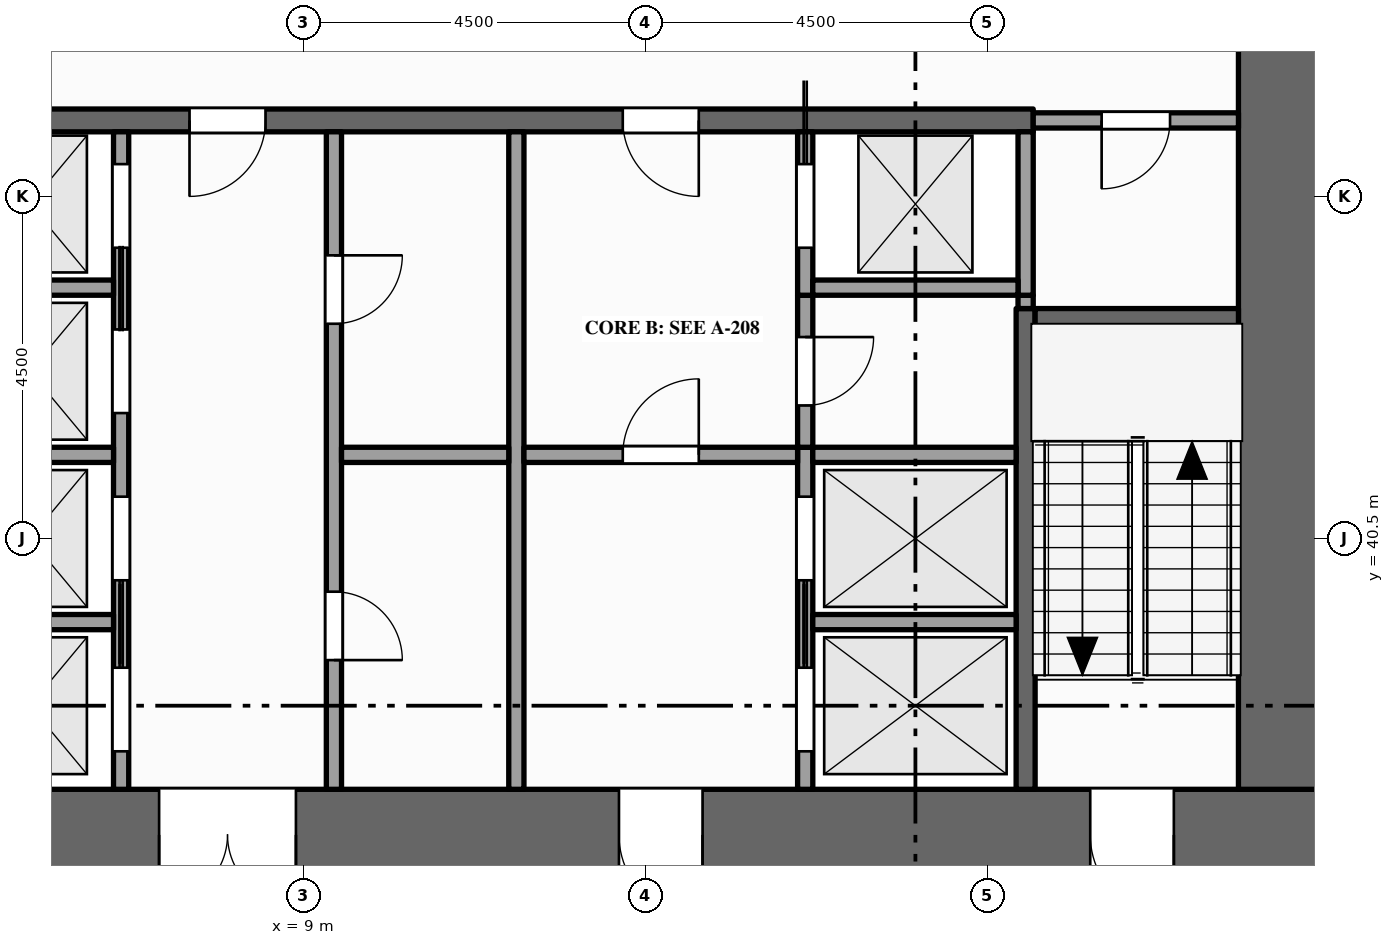
"""IFC4 building model, lengths in metres.
Left out: names, types, materials, properties, quantities, classifications, styles, units other than length and angle.
Written with IfcOpenShell. Run it as: python <this file> out.ifc"""

import sys

from ifc_helpers import new_model, si_unit, direction, frame, frame_2d, origin, place, context, subcontext, project, spatial, rectangle, extrude, element, fill, save


model = new_model("IFC4")
c1 = context("Model", 3, precision=1e-05, world=origin(), true_north=direction((0.0, 1.0)))
c2 = subcontext(c1, "Body", "Model", "MODEL_VIEW")
j1 = project(units=[si_unit("LENGTHUNIT", "METRE"), si_unit("PLANEANGLEUNIT", "RADIAN")], contexts=[c1])
p1 = place(None, origin())
s1 = spatial("IfcSite", under=j1, at=p1, CompositionType="ELEMENT")
p2 = place(p1, origin())
s2 = spatial("IfcBuilding", under=s1, at=p2, CompositionType="ELEMENT")
p3 = place(p2, frame((0.0, 0.0, 41.0)))
s3 = spatial("IfcBuildingStorey", under=s2, at=p3, CompositionType="ELEMENT", Elevation=41.0)
p4 = place(p3, frame((0.0, 36.6, -0.15), z_axis=(0.0, 0.0, 1.0), x_axis=(1.0, 0.0, 0.0)))
e1 = element("IfcWall", 1, at=p4, inside=s3, PredefinedType="SHEAR", context=c2, shape_type="SweptSolid", body=[
    extrude(rectangle(XDim=22.5, YDim=1.2, at=frame_2d((11.25, 0.0))), origin(), (0.0, 0.0, 1.0), 4.0),
])
p5 = place(p4, frame((7.1, 0.0, 0.15)))
e2 = element("IfcOpeningElement", 2, at=p5, cuts=e1, PredefinedType="OPENING", context=c2, shape_type="SweptSolid", body=[
    extrude(rectangle(XDim=1.8, YDim=2.1, at=frame_2d((0.9, 1.05))), frame((0.0, 0.61, 0.0), z_axis=(0.0, -1.0, 0.0), x_axis=(1.0, 0.0, 0.0)), (0.0, 0.0, 1.0), 1.22),
])
p6 = place(p4, frame((13.15, 0.0, 0.15)))
e3 = element("IfcOpeningElement", 3, at=p6, cuts=e1, PredefinedType="OPENING", context=c2, shape_type="SweptSolid", body=[
    extrude(rectangle(XDim=1.1, YDim=2.1, at=frame_2d((0.55, 1.05))), frame((0.0, 0.61, 0.0), z_axis=(0.0, -1.0, 0.0), x_axis=(1.0, 0.0, 0.0)), (0.0, 0.0, 1.0), 1.22),
])
p7 = place(p4, frame((2.15, 0.0, 0.15)))
e4 = element("IfcOpeningElement", 4, at=p7, cuts=e1, PredefinedType="OPENING", context=c2, shape_type="SweptSolid", body=[
    extrude(rectangle(XDim=1.1, YDim=2.1, at=frame_2d((0.55, 1.05))), frame((0.0, 0.61, 0.0), z_axis=(0.0, -1.0, 0.0), x_axis=(1.0, 0.0, 0.0)), (0.0, 0.0, 1.0), 1.22),
])
p8 = place(p4, frame((19.35, 0.0, 0.15)))
e5 = element("IfcOpeningElement", 5, at=p8, cuts=e1, PredefinedType="OPENING", context=c2, shape_type="SweptSolid", body=[
    extrude(rectangle(XDim=1.1, YDim=2.1, at=frame_2d((0.55, 1.05))), frame((0.0, 0.61, 0.0), z_axis=(0.0, -1.0, 0.0), x_axis=(1.0, 0.0, 0.0)), (0.0, 0.0, 1.0), 1.22),
])
p9 = place(p3, frame((21.9, 37.2, -0.15), z_axis=(0.0, 0.0, 1.0), x_axis=(0.0, 1.0, 0.0)))
e6 = element("IfcWall", 6, at=p9, inside=s3, PredefinedType="SHEAR", context=c2, shape_type="SweptSolid", body=[
    extrude(rectangle(XDim=11.1, YDim=1.2, at=frame_2d((5.55, 0.0))), origin(), (0.0, 0.0, 1.0), 4.0),
])
p10 = place(p3, frame((6.6, 37.2, 0.0), z_axis=(0.0, 0.0, 1.0), x_axis=(0.0, 1.0, 0.0)))
e7 = element("IfcWall", 7, at=p10, inside=s3, PredefinedType="SOLIDWALL", context=c2, shape_type="SweptSolid", body=[
    extrude(rectangle(XDim=8.65, YDim=0.2, at=frame_2d((4.325, 0.0))), origin(), (0.0, 0.0, 1.0), 3.85),
])
p11 = place(p10, frame((0.5, 0.0, 0.012)))
e8 = element("IfcOpeningElement", 8, at=p11, cuts=e7, PredefinedType="OPENING", context=c2, shape_type="SweptSolid", body=[
    extrude(rectangle(XDim=1.1, YDim=2.1, at=frame_2d((0.55, 1.05))), frame((0.0, 0.11, 0.0), z_axis=(0.0, -1.0, 0.0), x_axis=(1.0, 0.0, 0.0)), (0.0, 0.0, 1.0), 0.22),
])
p12 = place(p10, frame((2.75, 0.0, 0.012)))
e9 = element("IfcOpeningElement", 9, at=p12, cuts=e7, PredefinedType="OPENING", context=c2, shape_type="SweptSolid", body=[
    extrude(rectangle(XDim=1.1, YDim=2.1, at=frame_2d((0.55, 1.05))), frame((0.0, 0.11, 0.0), z_axis=(0.0, -1.0, 0.0), x_axis=(1.0, 0.0, 0.0)), (0.0, 0.0, 1.0), 0.22),
])
p13 = place(p10, frame((4.95, 0.0, 0.012)))
e10 = element("IfcOpeningElement", 10, at=p13, cuts=e7, PredefinedType="OPENING", context=c2, shape_type="SweptSolid", body=[
    extrude(rectangle(XDim=1.1, YDim=2.1, at=frame_2d((0.55, 1.05))), frame((0.0, 0.11, 0.0), z_axis=(0.0, -1.0, 0.0), x_axis=(1.0, 0.0, 0.0)), (0.0, 0.0, 1.0), 0.22),
])
p14 = place(p10, frame((7.125, 0.0, 0.012)))
e11 = element("IfcOpeningElement", 11, at=p14, cuts=e7, PredefinedType="OPENING", context=c2, shape_type="SweptSolid", body=[
    extrude(rectangle(XDim=1.1, YDim=2.1, at=frame_2d((0.55, 1.05))), frame((0.0, 0.11, 0.0), z_axis=(0.0, -1.0, 0.0), x_axis=(1.0, 0.0, 0.0)), (0.0, 0.0, 1.0), 0.22),
])
p15 = place(p3, frame((9.4, 37.2, 0.0), z_axis=(0.0, 0.0, 1.0), x_axis=(0.0, 1.0, 0.0)))
e12 = element("IfcWall", 12, at=p15, inside=s3, PredefinedType="PARTITIONING", context=c2, shape_type="SweptSolid", body=[
    extrude(rectangle(XDim=8.65, YDim=0.2, at=frame_2d((4.325, 0.0))), origin(), (0.0, 0.0, 1.0), 3.85),
])
p16 = place(p15, frame((1.7, 0.0, 0.0)))
e13 = element("IfcOpeningElement", 13, at=p16, cuts=e12, PredefinedType="OPENING", context=c2, shape_type="SweptSolid", body=[
    extrude(rectangle(XDim=0.9, YDim=2.1, at=frame_2d((0.45, 1.05))), frame((0.0, 0.11, 0.0), z_axis=(0.0, -1.0, 0.0), x_axis=(1.0, 0.0, 0.0)), (0.0, 0.0, 1.0), 0.22),
])
p17 = place(p15, frame((6.125, 0.0, 0.0)))
e14 = element("IfcOpeningElement", 14, at=p17, cuts=e12, PredefinedType="OPENING", context=c2, shape_type="SweptSolid", body=[
    extrude(rectangle(XDim=0.9, YDim=2.1, at=frame_2d((0.45, 1.05))), frame((0.0, 0.11, 0.0), z_axis=(0.0, -1.0, 0.0), x_axis=(1.0, 0.0, 0.0)), (0.0, 0.0, 1.0), 0.22),
])
p18 = place(p3, frame((11.8, 37.2, 0.0), z_axis=(0.0, 0.0, 1.0), x_axis=(0.0, 1.0, 0.0)))
e15 = element("IfcWall", 15, at=p18, inside=s3, PredefinedType="PARTITIONING", context=c2, shape_type="SweptSolid", body=[
    extrude(rectangle(XDim=8.65, YDim=0.2, at=frame_2d((4.325, 0.0))), origin(), (0.0, 0.0, 1.0), 3.85),
])
p19 = place(p3, frame((15.6, 37.2, 0.0), z_axis=(0.0, 0.0, 1.0), x_axis=(0.0, 1.0, 0.0)))
e16 = element("IfcWall", 16, at=p19, inside=s3, PredefinedType="SOLIDWALL", context=c2, shape_type="SweptSolid", body=[
    extrude(rectangle(XDim=4.5, YDim=0.2, at=frame_2d((2.25, 0.0))), origin(), (0.0, 0.0, 1.0), 3.85),
])
p20 = place(p19, frame((0.5, 0.0, 0.012)))
e17 = element("IfcOpeningElement", 17, at=p20, cuts=e16, PredefinedType="OPENING", context=c2, shape_type="SweptSolid", body=[
    extrude(rectangle(XDim=1.1, YDim=2.1, at=frame_2d((0.55, 1.05))), frame((0.0, 0.11, 0.0), z_axis=(0.0, -1.0, 0.0), x_axis=(1.0, 0.0, 0.0)), (0.0, 0.0, 1.0), 0.22),
])
p21 = place(p19, frame((2.75, 0.0, 0.012)))
e18 = element("IfcOpeningElement", 18, at=p21, cuts=e16, PredefinedType="OPENING", context=c2, shape_type="SweptSolid", body=[
    extrude(rectangle(XDim=1.1, YDim=2.1, at=frame_2d((0.55, 1.05))), frame((0.0, 0.11, 0.0), z_axis=(0.0, -1.0, 0.0), x_axis=(1.0, 0.0, 0.0)), (0.0, 0.0, 1.0), 0.22),
])
p22 = place(p3, frame((15.6, 41.7, 0.0), z_axis=(0.0, 0.0, 1.0), x_axis=(0.0, 1.0, 0.0)))
e19 = element("IfcWall", 19, at=p22, inside=s3, PredefinedType="PARTITIONING", context=c2, shape_type="SweptSolid", body=[
    extrude(rectangle(XDim=2.0, YDim=0.2, at=frame_2d((1.0, 0.0))), origin(), (0.0, 0.0, 1.0), 3.85),
])
p23 = place(p22, frame((0.55, 0.0, 0.0)))
e20 = element("IfcOpeningElement", 20, at=p23, cuts=e19, PredefinedType="OPENING", context=c2, shape_type="SweptSolid", body=[
    extrude(rectangle(XDim=0.9, YDim=2.1, at=frame_2d((0.45, 1.05))), frame((0.0, 0.11, 0.0), z_axis=(0.0, -1.0, 0.0), x_axis=(1.0, 0.0, 0.0)), (0.0, 0.0, 1.0), 0.22),
])
p24 = place(p3, frame((15.6, 43.7, 0.0), z_axis=(0.0, 0.0, 1.0), x_axis=(0.0, 1.0, 0.0)))
e21 = element("IfcWall", 21, at=p24, inside=s3, PredefinedType="SOLIDWALL", context=c2, shape_type="SweptSolid", body=[
    extrude(rectangle(XDim=2.15, YDim=0.2, at=frame_2d((1.075, 0.0))), origin(), (0.0, 0.0, 1.0), 3.85),
])
p25 = place(p24, frame((0.625, 0.0, 0.012)))
e22 = element("IfcOpeningElement", 22, at=p25, cuts=e21, PredefinedType="OPENING", context=c2, shape_type="SweptSolid", body=[
    extrude(rectangle(XDim=1.1, YDim=2.1, at=frame_2d((0.55, 1.05))), frame((0.0, 0.11, 0.0), z_axis=(0.0, -1.0, 0.0), x_axis=(1.0, 0.0, 0.0)), (0.0, 0.0, 1.0), 0.22),
])
p26 = place(p3, frame((18.5, 37.2, 0.0), z_axis=(0.0, 0.0, 1.0), x_axis=(0.0, 1.0, 0.0)))
e23 = element("IfcWall", 23, at=p26, inside=s3, PredefinedType="SHEAR", context=c2, shape_type="SweptSolid", body=[
    extrude(rectangle(XDim=6.325, YDim=0.25, at=frame_2d((3.163, 0.0))), origin(), (0.0, 0.0, 1.0), 3.85),
])
p27 = place(p3, frame((18.5, 43.525, 0.0), z_axis=(0.0, 0.0, 1.0), x_axis=(0.0, 1.0, 0.0)))
e24 = element("IfcWall", 24, at=p27, inside=s3, PredefinedType="PARTITIONING", context=c2, shape_type="SweptSolid", body=[
    extrude(rectangle(XDim=0.175, YDim=0.2, at=frame_2d((0.087, 0.0))), origin(), (0.0, 0.0, 1.0), 3.85),
])
p28 = place(p3, frame((18.5, 43.7, 0.0), z_axis=(0.0, 0.0, 1.0), x_axis=(0.0, 1.0, 0.0)))
e25 = element("IfcWall", 25, at=p28, inside=s3, PredefinedType="SOLIDWALL", context=c2, shape_type="SweptSolid", body=[
    extrude(rectangle(XDim=2.15, YDim=0.2, at=frame_2d((1.075, 0.0))), origin(), (0.0, 0.0, 1.0), 3.85),
])
p29 = place(p3, frame((4.325, 39.4, 0.0), z_axis=(0.0, 0.0, 1.0), x_axis=(1.0, 0.0, 0.0)))
e26 = element("IfcWall", 26, at=p29, inside=s3, PredefinedType="SOLIDWALL", context=c2, shape_type="SweptSolid", body=[
    extrude(rectangle(XDim=2.175, YDim=0.2, at=frame_2d((1.087, 0.0))), origin(), (0.0, 0.0, 1.0), 3.85),
])
p30 = place(p3, frame((15.7, 39.4, 0.0), z_axis=(0.0, 0.0, 1.0), x_axis=(1.0, 0.0, 0.0)))
e27 = element("IfcWall", 27, at=p30, inside=s3, PredefinedType="SOLIDWALL", context=c2, shape_type="SweptSolid", body=[
    extrude(rectangle(XDim=2.675, YDim=0.2, at=frame_2d((1.337, 0.0))), origin(), (0.0, 0.0, 1.0), 3.85),
])
p31 = place(p3, frame((4.325, 41.6, 0.0), z_axis=(0.0, 0.0, 1.0), x_axis=(1.0, 0.0, 0.0)))
e28 = element("IfcWall", 28, at=p31, inside=s3, PredefinedType="SOLIDWALL", context=c2, shape_type="SweptSolid", body=[
    extrude(rectangle(XDim=2.175, YDim=0.2, at=frame_2d((1.087, 0.0))), origin(), (0.0, 0.0, 1.0), 3.85),
])
p32 = place(p3, frame((9.5, 41.6, 0.0), z_axis=(0.0, 0.0, 1.0), x_axis=(1.0, 0.0, 0.0)))
e29 = element("IfcWall", 29, at=p32, inside=s3, PredefinedType="PARTITIONING", context=c2, shape_type="SweptSolid", body=[
    extrude(rectangle(XDim=2.2, YDim=0.2, at=frame_2d((1.1, 0.0))), origin(), (0.0, 0.0, 1.0), 3.85),
])
p33 = place(p3, frame((11.9, 41.6, 0.0), z_axis=(0.0, 0.0, 1.0), x_axis=(1.0, 0.0, 0.0)))
e30 = element("IfcWall", 30, at=p33, inside=s3, PredefinedType="PARTITIONING", context=c2, shape_type="SweptSolid", body=[
    extrude(rectangle(XDim=3.6, YDim=0.2, at=frame_2d((1.8, 0.0))), origin(), (0.0, 0.0, 1.0), 3.85),
])
p34 = place(p33, frame((1.3, 0.0, 0.0)))
e31 = element("IfcOpeningElement", 31, at=p34, cuts=e30, PredefinedType="OPENING", context=c2, shape_type="SweptSolid", body=[
    extrude(rectangle(XDim=1.0, YDim=2.1, at=frame_2d((0.5, 1.05))), frame((0.0, 0.11, 0.0), z_axis=(0.0, -1.0, 0.0), x_axis=(1.0, 0.0, 0.0)), (0.0, 0.0, 1.0), 0.22),
])
p35 = place(p3, frame((15.7, 41.6, 0.0), z_axis=(0.0, 0.0, 1.0), x_axis=(1.0, 0.0, 0.0)))
e32 = element("IfcWall", 32, at=p35, inside=s3, PredefinedType="SOLIDWALL", context=c2, shape_type="SweptSolid", body=[
    extrude(rectangle(XDim=2.675, YDim=0.2, at=frame_2d((1.337, 0.0))), origin(), (0.0, 0.0, 1.0), 3.85),
])
p36 = place(p3, frame((18.625, 43.4, 0.0), z_axis=(0.0, 0.0, 1.0), x_axis=(1.0, 0.0, 0.0)))
e33 = element("IfcWall", 33, at=p36, inside=s3, PredefinedType="SHEAR", context=c2, shape_type="SweptSolid", body=[
    extrude(rectangle(XDim=2.675, YDim=0.25, at=frame_2d((1.337, 0.0))), origin(), (0.0, 0.0, 1.0), 3.85),
])
p37 = place(p3, frame((4.3, 43.8, 0.0), z_axis=(0.0, 0.0, 1.0), x_axis=(1.0, 0.0, 0.0)))
e34 = element("IfcWall", 34, at=p37, inside=s3, PredefinedType="SOLIDWALL", context=c2, shape_type="SweptSolid", body=[
    extrude(rectangle(XDim=2.2, YDim=0.2, at=frame_2d((1.1, 0.0))), origin(), (0.0, 0.0, 1.0), 3.85),
])
p38 = place(p3, frame((15.7, 43.8, 0.0), z_axis=(0.0, 0.0, 1.0), x_axis=(1.0, 0.0, 0.0)))
e35 = element("IfcWall", 35, at=p38, inside=s3, PredefinedType="SOLIDWALL", context=c2, shape_type="SweptSolid", body=[
    extrude(rectangle(XDim=2.7, YDim=0.2, at=frame_2d((1.35, 0.0))), origin(), (0.0, 0.0, 1.0), 3.85),
])
p39 = place(p3, frame((4.1, 46.0, 0.0), z_axis=(0.0, 0.0, 1.0), x_axis=(1.0, 0.0, 0.0)))
e36 = element("IfcWall", 36, at=p39, inside=s3, PredefinedType="SHEAR", context=c2, shape_type="SweptSolid", body=[
    extrude(rectangle(XDim=14.5, YDim=0.3, at=frame_2d((7.25, 0.0))), origin(), (0.0, 0.0, 1.0), 3.85),
])
p40 = place(p39, frame((3.4, 0.0, 0.0)))
e37 = element("IfcOpeningElement", 37, at=p40, cuts=e36, PredefinedType="OPENING", context=c2, shape_type="SweptSolid", body=[
    extrude(rectangle(XDim=1.0, YDim=2.1, at=frame_2d((0.5, 1.05))), frame((0.0, 0.16, 0.0), z_axis=(0.0, -1.0, 0.0), x_axis=(1.0, 0.0, 0.0)), (0.0, 0.0, 1.0), 0.32),
])
p41 = place(p39, frame((9.1, 0.0, 0.0)))
e38 = element("IfcOpeningElement", 38, at=p41, cuts=e36, PredefinedType="OPENING", context=c2, shape_type="SweptSolid", body=[
    extrude(rectangle(XDim=1.0, YDim=2.1, at=frame_2d((0.5, 1.05))), frame((0.0, 0.16, 0.0), z_axis=(0.0, -1.0, 0.0), x_axis=(1.0, 0.0, 0.0)), (0.0, 0.0, 1.0), 0.32),
])
p42 = place(p3, frame((18.6, 46.0, 0.0), z_axis=(0.0, 0.0, 1.0), x_axis=(1.0, 0.0, 0.0)))
e39 = element("IfcWall", 39, at=p42, inside=s3, PredefinedType="PARTITIONING", context=c2, shape_type="SweptSolid", body=[
    extrude(rectangle(XDim=2.7, YDim=0.2, at=frame_2d((1.35, 0.0))), origin(), (0.0, 0.0, 1.0), 3.85),
])
p43 = place(p42, frame((0.9, 0.0, 0.0)))
e40 = element("IfcOpeningElement", 40, at=p43, cuts=e39, PredefinedType="OPENING", context=c2, shape_type="SweptSolid", body=[
    extrude(rectangle(XDim=0.9, YDim=2.1, at=frame_2d((0.45, 1.05))), frame((0.0, 0.11, 0.0), z_axis=(0.0, -1.0, 0.0), x_axis=(1.0, 0.0, 0.0)), (0.0, 0.0, 1.0), 0.22),
])
p44 = place(p11, origin())
e41 = element("IfcDoor", 41, at=p44, inside=s3, OperationType="SLIDING_TO_RIGHT", PredefinedType="DOOR", context=c2, shape_type="SweptSolid", body=[
    extrude(rectangle(XDim=1.1, YDim=2.1, at=frame_2d((0.55, 1.05))), frame((0.0, 0.025, 0.0), z_axis=(0.0, -1.0, 0.0), x_axis=(1.0, 0.0, 0.0)), (0.0, 0.0, 1.0), 0.05),
])
fill(e8, e41)
p45 = place(p12, origin())
e42 = element("IfcDoor", 42, at=p45, inside=s3, OperationType="SLIDING_TO_LEFT", PredefinedType="DOOR", context=c2, shape_type="SweptSolid", body=[
    extrude(rectangle(XDim=1.1, YDim=2.1, at=frame_2d((0.55, 1.05))), frame((0.0, 0.025, 0.0), z_axis=(0.0, -1.0, 0.0), x_axis=(1.0, 0.0, 0.0)), (0.0, 0.0, 1.0), 0.05),
])
fill(e9, e42)
p46 = place(p13, origin())
e43 = element("IfcDoor", 43, at=p46, inside=s3, OperationType="SLIDING_TO_RIGHT", PredefinedType="DOOR", context=c2, shape_type="SweptSolid", body=[
    extrude(rectangle(XDim=1.1, YDim=2.1, at=frame_2d((0.55, 1.05))), frame((0.0, 0.025, 0.0), z_axis=(0.0, -1.0, 0.0), x_axis=(1.0, 0.0, 0.0)), (0.0, 0.0, 1.0), 0.05),
])
fill(e10, e43)
p47 = place(p14, origin())
e44 = element("IfcDoor", 44, at=p47, inside=s3, OperationType="SLIDING_TO_LEFT", PredefinedType="DOOR", context=c2, shape_type="SweptSolid", body=[
    extrude(rectangle(XDim=1.1, YDim=2.1, at=frame_2d((0.55, 1.05))), frame((0.0, 0.025, 0.0), z_axis=(0.0, -1.0, 0.0), x_axis=(1.0, 0.0, 0.0)), (0.0, 0.0, 1.0), 0.05),
])
fill(e11, e44)
p48 = place(p20, origin())
e45 = element("IfcDoor", 45, at=p48, inside=s3, OperationType="SLIDING_TO_RIGHT", PredefinedType="DOOR", context=c2, shape_type="SweptSolid", body=[
    extrude(rectangle(XDim=1.1, YDim=2.1, at=frame_2d((0.55, 1.05))), frame((0.0, 0.025, 0.0), z_axis=(0.0, -1.0, 0.0), x_axis=(1.0, 0.0, 0.0)), (0.0, 0.0, 1.0), 0.05),
])
fill(e17, e45)
p49 = place(p21, origin())
e46 = element("IfcDoor", 46, at=p49, inside=s3, OperationType="SLIDING_TO_LEFT", PredefinedType="DOOR", context=c2, shape_type="SweptSolid", body=[
    extrude(rectangle(XDim=1.1, YDim=2.1, at=frame_2d((0.55, 1.05))), frame((0.0, 0.025, 0.0), z_axis=(0.0, -1.0, 0.0), x_axis=(1.0, 0.0, 0.0)), (0.0, 0.0, 1.0), 0.05),
])
fill(e18, e46)
p50 = place(p25, origin())
e47 = element("IfcDoor", 47, at=p50, inside=s3, OperationType="SLIDING_TO_RIGHT", PredefinedType="DOOR", context=c2, shape_type="SweptSolid", body=[
    extrude(rectangle(XDim=1.1, YDim=2.1, at=frame_2d((0.55, 1.05))), frame((0.0, 0.025, 0.0), z_axis=(0.0, -1.0, 0.0), x_axis=(1.0, 0.0, 0.0)), (0.0, 0.0, 1.0), 0.05),
])
fill(e22, e47)
p51 = place(p5, origin())
e48 = element("IfcDoor", 48, at=p51, inside=s3, OperationType="DOUBLE_DOOR_SINGLE_SWING", PredefinedType="DOOR", context=c2, shape_type="SweptSolid", body=[
    extrude(rectangle(XDim=1.8, YDim=2.1, at=frame_2d((0.9, 1.05))), frame((0.0, 0.025, 0.0), z_axis=(0.0, -1.0, 0.0), x_axis=(1.0, 0.0, 0.0)), (0.0, 0.0, 1.0), 0.05),
])
fill(e2, e48)
p52 = place(p40, origin())
e49 = element("IfcDoor", 49, at=p52, inside=s3, OperationType="SINGLE_SWING_LEFT", PredefinedType="DOOR", context=c2, shape_type="SweptSolid", body=[
    extrude(rectangle(XDim=1.0, YDim=2.1, at=frame_2d((0.5, 1.05))), frame((0.0, 0.025, 0.0), z_axis=(0.0, -1.0, 0.0), x_axis=(1.0, 0.0, 0.0)), (0.0, 0.0, 1.0), 0.05),
])
fill(e37, e49)
p53 = place(p6, origin())
e50 = element("IfcDoor", 50, at=p53, inside=s3, OperationType="SINGLE_SWING_RIGHT", PredefinedType="DOOR", context=c2, shape_type="SweptSolid", body=[
    extrude(rectangle(XDim=1.1, YDim=2.1, at=frame_2d((0.55, 1.05))), frame((0.0, 0.025, 0.0), z_axis=(0.0, -1.0, 0.0), x_axis=(1.0, 0.0, 0.0)), (0.0, 0.0, 1.0), 0.05),
])
fill(e3, e50)
p54 = place(p34, origin())
e51 = element("IfcDoor", 51, at=p54, inside=s3, OperationType="SINGLE_SWING_RIGHT", PredefinedType="DOOR", context=c2, shape_type="SweptSolid", body=[
    extrude(rectangle(XDim=1.0, YDim=2.1, at=frame_2d((0.5, 1.05))), frame((0.0, 0.025, 0.0), z_axis=(0.0, -1.0, 0.0), x_axis=(1.0, 0.0, 0.0)), (0.0, 0.0, 1.0), 0.05),
])
fill(e31, e51)
p55 = place(p41, origin())
e52 = element("IfcDoor", 52, at=p55, inside=s3, OperationType="SINGLE_SWING_RIGHT", PredefinedType="DOOR", context=c2, shape_type="SweptSolid", body=[
    extrude(rectangle(XDim=1.0, YDim=2.1, at=frame_2d((0.5, 1.05))), frame((0.0, 0.025, 0.0), z_axis=(0.0, -1.0, 0.0), x_axis=(1.0, 0.0, 0.0)), (0.0, 0.0, 1.0), 0.05),
])
fill(e38, e52)
p56 = place(p8, origin())
e53 = element("IfcDoor", 53, at=p56, inside=s3, OperationType="SINGLE_SWING_RIGHT", PredefinedType="DOOR", context=c2, shape_type="SweptSolid", body=[
    extrude(rectangle(XDim=1.1, YDim=2.1, at=frame_2d((0.55, 1.05))), frame((0.0, 0.025, 0.0), z_axis=(0.0, -1.0, 0.0), x_axis=(1.0, 0.0, 0.0)), (0.0, 0.0, 1.0), 0.05),
])
fill(e5, e53)
p57 = place(p43, origin())
e54 = element("IfcDoor", 54, at=p57, inside=s3, OperationType="SINGLE_SWING_LEFT", PredefinedType="DOOR", context=c2, shape_type="SweptSolid", body=[
    extrude(rectangle(XDim=0.9, YDim=2.1, at=frame_2d((0.45, 1.05))), frame((0.0, 0.025, 0.0), z_axis=(0.0, -1.0, 0.0), x_axis=(1.0, 0.0, 0.0)), (0.0, 0.0, 1.0), 0.05),
])
fill(e40, e54)
p58 = place(p16, origin())
e55 = element("IfcDoor", 55, at=p58, inside=s3, OperationType="SINGLE_SWING_LEFT", PredefinedType="DOOR", context=c2, shape_type="SweptSolid", body=[
    extrude(rectangle(XDim=0.9, YDim=2.1, at=frame_2d((0.45, 1.05))), frame((0.0, 0.025, 0.0), z_axis=(0.0, -1.0, 0.0), x_axis=(1.0, 0.0, 0.0)), (0.0, 0.0, 1.0), 0.05),
])
fill(e13, e55)
p59 = place(p17, origin())
e56 = element("IfcDoor", 56, at=p59, inside=s3, OperationType="SINGLE_SWING_RIGHT", PredefinedType="DOOR", context=c2, shape_type="SweptSolid", body=[
    extrude(rectangle(XDim=0.9, YDim=2.1, at=frame_2d((0.45, 1.05))), frame((0.0, 0.025, 0.0), z_axis=(0.0, -1.0, 0.0), x_axis=(1.0, 0.0, 0.0)), (0.0, 0.0, 1.0), 0.05),
])
fill(e14, e56)
p60 = place(p23, origin())
e57 = element("IfcDoor", 57, at=p60, inside=s3, OperationType="SINGLE_SWING_RIGHT", PredefinedType="DOOR", context=c2, shape_type="SweptSolid", body=[
    extrude(rectangle(XDim=0.9, YDim=2.1, at=frame_2d((0.45, 1.05))), frame((0.0, 0.025, 0.0), z_axis=(0.0, -1.0, 0.0), x_axis=(1.0, 0.0, 0.0)), (0.0, 0.0, 1.0), 0.05),
])
fill(e20, e57)
save(model, sys.argv[1])
